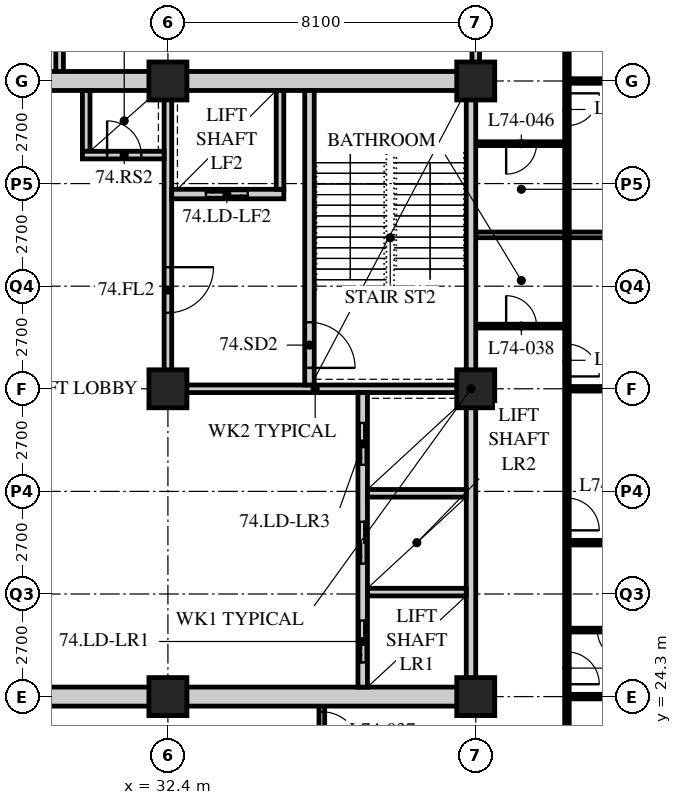
"""IFC4 building model, lengths in metres.
Left out: names, types, materials, properties, quantities, classifications, styles, units other than length and angle.
Written with IfcOpenShell. Run it as: python <this file> out.ifc"""

import sys

from ifc_helpers import new_model, si_unit, direction, frame, frame_2d, origin, origin_2d, place, context, subcontext, project, spatial, rectangle, hollow_rectangle, extrude, element, fill, save


model = new_model("IFC4")
c1 = context("Model", 3, precision=1e-05, world=origin(), true_north=direction((0.0, 1.0)))
c2 = subcontext(c1, "Body", "Model", "MODEL_VIEW")
j1 = project(units=[si_unit("LENGTHUNIT", "METRE"), si_unit("PLANEANGLEUNIT", "RADIAN")], contexts=[c1])
p1 = place(None, origin())
s1 = spatial("IfcSite", under=j1, at=p1, CompositionType="ELEMENT")
p2 = place(p1, origin())
s2 = spatial("IfcBuilding", under=s1, at=p2, CompositionType="ELEMENT")
p3 = place(p2, frame((0.0, 0.0, 289.2)))
s3 = spatial("IfcBuildingStorey", under=s2, at=p3, CompositionType="ELEMENT", Elevation=289.2)
for number, where, z_axis, x_axis in (
    (1, (32.4, 24.3, 0.0), (0.0, 0.0, 1.0), (1.0, 0.0, 0.0)),
    (2, (32.4, 32.4, 0.0), (0.0, 0.0, 1.0), (1.0, 0.0, 0.0)),
    (3, (32.4, 40.5, 0.0), (0.0, 0.0, 1.0), (1.0, 0.0, 0.0)),
    (4, (40.5, 24.3, 0.0), (0.0, 0.0, 1.0), (1.0, 0.0, 0.0)),
    (5, (40.5, 32.4, 0.0), (0.0, 0.0, 1.0), (1.0, 0.0, 0.0)),
    (6, (40.5, 40.5, 0.0), (0.0, 0.0, 1.0), (1.0, 0.0, 0.0)),
):
    element("IfcColumn", number, at=place(p3, frame(where, z_axis=z_axis, x_axis=x_axis)), inside=s3, PredefinedType="COLUMN", context=c2, shape_type="SweptSolid", body=[
        extrude(hollow_rectangle(XDim=1.0, YDim=1.0, WallThickness=0.1, at=origin_2d()), origin(), (0.0, 0.0, 1.0), 3.9),
    ])
p4 = place(p3, frame((29.55, 40.5, 0.0), z_axis=(0.0, 0.0, 1.0), x_axis=(0.0, 1.0, 0.0)))
e7 = element("IfcWall", 7, at=p4, inside=s3, PredefinedType="SOLIDWALL", context=c2, shape_type="SweptSolid", body=[
    extrude(rectangle(XDim=6.3, YDim=0.2, at=frame_2d((3.15, 0.0))), origin(), (0.0, 0.0, 1.0), 3.69),
])
p5 = place(p3, frame((36.45, 22.5, 0.0), z_axis=(0.0, 0.0, 1.0), x_axis=(0.0, 1.0, 0.0)))
e8 = element("IfcWall", 8, at=p5, inside=s3, PredefinedType="PARTITIONING", context=c2, shape_type="SweptSolid", body=[
    extrude(rectangle(XDim=1.8, YDim=0.15, at=frame_2d((0.9, 0.0))), origin(), (0.0, 0.0, 1.0), 3.69),
])
p6 = place(p5, frame((0.4, 0.0, 0.0)))
e9 = element("IfcOpeningElement", 9, at=p6, cuts=e8, PredefinedType="OPENING", context=c2, shape_type="SweptSolid", body=[
    extrude(rectangle(XDim=1.0, YDim=2.1, at=frame_2d((0.5, 1.05))), frame((0.0, 0.085, 0.0), z_axis=(0.0, -1.0, 0.0), x_axis=(1.0, 0.0, 0.0)), (0.0, 0.0, 1.0), 0.17),
])
p7 = place(p3, frame((40.5, 40.5, 0.0), z_axis=(0.0, 0.0, 1.0), x_axis=(0.0, 1.0, 0.0)))
e10 = element("IfcWall", 10, at=p7, inside=s3, PredefinedType="SOLIDWALL", context=c2, shape_type="SweptSolid", body=[
    extrude(rectangle(XDim=6.3, YDim=0.2, at=frame_2d((3.15, 0.0))), origin(), (0.0, 0.0, 1.0), 3.078),
])
p8 = place(p3, frame((40.5, 34.05, 0.0), z_axis=(0.0, 0.0, 1.0), x_axis=(1.0, 0.0, 0.0)))
e11 = element("IfcWall", 11, at=p8, inside=s3, PredefinedType="PARTITIONING", context=c2, shape_type="SweptSolid", body=[
    extrude(rectangle(XDim=2.4, YDim=0.1, at=frame_2d((1.2, 0.0))), origin(), (0.0, 0.0, 1.0), 3.69),
])
p9 = place(p8, frame((0.8, 0.0, 0.0)))
e12 = element("IfcOpeningElement", 12, at=p9, cuts=e11, PredefinedType="OPENING", context=c2, shape_type="SweptSolid", body=[
    extrude(rectangle(XDim=0.8, YDim=2.1, at=frame_2d((0.4, 1.05))), frame((0.0, 0.06, 0.0), z_axis=(0.0, -1.0, 0.0), x_axis=(1.0, 0.0, 0.0)), (0.0, 0.0, 1.0), 0.12),
])
p10 = place(p3, frame((42.9, 22.5, 0.0), z_axis=(0.0, 0.0, 1.0), x_axis=(0.0, 1.0, 0.0)))
e13 = element("IfcWall", 13, at=p10, inside=s3, PredefinedType="PARTITIONING", context=c2, shape_type="SweptSolid", body=[
    extrude(rectangle(XDim=13.95, YDim=0.12, at=frame_2d((6.975, 0.0))), origin(), (0.0, 0.0, 1.0), 3.69),
])
p11 = place(p10, frame((2.125, 0.0, 0.0)))
e14 = element("IfcOpeningElement", 14, at=p11, cuts=e13, PredefinedType="OPENING", context=c2, shape_type="SweptSolid", body=[
    extrude(rectangle(XDim=0.85, YDim=2.1, at=frame_2d((0.425, 1.05))), frame((0.0, 0.07, 0.0), z_axis=(0.0, -1.0, 0.0), x_axis=(1.0, 0.0, 0.0)), (0.0, 0.0, 1.0), 0.14),
])
p12 = place(p10, frame((6.175, 0.0, 0.0)))
e15 = element("IfcOpeningElement", 15, at=p12, cuts=e13, PredefinedType="OPENING", context=c2, shape_type="SweptSolid", body=[
    extrude(rectangle(XDim=0.85, YDim=2.1, at=frame_2d((0.425, 1.05))), frame((0.0, 0.07, 0.0), z_axis=(0.0, -1.0, 0.0), x_axis=(1.0, 0.0, 0.0)), (0.0, 0.0, 1.0), 0.14),
])
p13 = place(p10, frame((10.225, 0.0, 0.0)))
e16 = element("IfcOpeningElement", 16, at=p13, cuts=e13, PredefinedType="OPENING", context=c2, shape_type="SweptSolid", body=[
    extrude(rectangle(XDim=0.85, YDim=2.1, at=frame_2d((0.425, 1.05))), frame((0.0, 0.07, 0.0), z_axis=(0.0, -1.0, 0.0), x_axis=(1.0, 0.0, 0.0)), (0.0, 0.0, 1.0), 0.14),
])
p14 = place(p3, frame((42.9, 24.3, 0.0), z_axis=(0.0, 0.0, 1.0), x_axis=(1.0, 0.0, 0.0)))
e17 = element("IfcWall", 17, at=p14, inside=s3, PredefinedType="PARTITIONING", context=c2, shape_type="SweptSolid", body=[
    extrude(rectangle(XDim=9.45, YDim=0.12, at=frame_2d((4.725, 0.0))), origin(), (0.0, 0.0, 1.0), 3.078),
])
p15 = place(p3, frame((40.5, 36.45, 0.0), z_axis=(0.0, 0.0, 1.0), x_axis=(1.0, 0.0, 0.0)))
e18 = element("IfcWall", 18, at=p15, inside=s3, PredefinedType="PARTITIONING", context=c2, shape_type="SweptSolid", body=[
    extrude(rectangle(XDim=15.9, YDim=0.15, at=frame_2d((7.95, 0.0))), origin(), (0.0, 0.0, 1.0), 3.69),
])
p16 = place(p3, frame((42.9, 26.05, 0.0), z_axis=(0.0, 0.0, 1.0), x_axis=(1.0, 0.0, 0.0)))
e19 = element("IfcWall", 19, at=p16, inside=s3, PredefinedType="PARTITIONING", context=c2, shape_type="SweptSolid", body=[
    extrude(rectangle(XDim=2.4, YDim=0.1, at=frame_2d((1.2, 0.0))), origin(), (0.0, 0.0, 1.0), 3.69),
])
p17 = place(p16, frame((0.8, 0.0, 0.0)))
e20 = element("IfcOpeningElement", 20, at=p17, cuts=e19, PredefinedType="OPENING", context=c2, shape_type="SweptSolid", body=[
    extrude(rectangle(XDim=0.8, YDim=2.1, at=frame_2d((0.4, 1.05))), frame((0.0, 0.06, 0.0), z_axis=(0.0, -1.0, 0.0), x_axis=(1.0, 0.0, 0.0)), (0.0, 0.0, 1.0), 0.12),
])
p18 = place(p3, frame((42.9, 28.35, 0.0), z_axis=(0.0, 0.0, 1.0), x_axis=(1.0, 0.0, 0.0)))
e21 = element("IfcWall", 21, at=p18, inside=s3, PredefinedType="PARTITIONING", context=c2, shape_type="SweptSolid", body=[
    extrude(rectangle(XDim=13.5, YDim=0.12, at=frame_2d((6.75, 0.0))), origin(), (0.0, 0.0, 1.0), 3.69),
])
p19 = place(p3, frame((42.9, 32.4, 0.0), z_axis=(0.0, 0.0, 1.0), x_axis=(1.0, 0.0, 0.0)))
e22 = element("IfcWall", 22, at=p19, inside=s3, PredefinedType="PARTITIONING", context=c2, shape_type="SweptSolid", body=[
    extrude(rectangle(XDim=13.5, YDim=0.12, at=frame_2d((6.75, 0.0))), origin(), (0.0, 0.0, 1.0), 3.078),
])
p20 = place(p3, frame((40.5, 38.85, 0.0), z_axis=(0.0, 0.0, 1.0), x_axis=(1.0, 0.0, 0.0)))
e23 = element("IfcWall", 23, at=p20, inside=s3, PredefinedType="PARTITIONING", context=c2, shape_type="SweptSolid", body=[
    extrude(rectangle(XDim=2.4, YDim=0.1, at=frame_2d((1.2, 0.0))), origin(), (0.0, 0.0, 1.0), 3.69),
])
p21 = place(p20, frame((0.8, 0.0, 0.0)))
e24 = element("IfcOpeningElement", 24, at=p21, cuts=e23, PredefinedType="OPENING", context=c2, shape_type="SweptSolid", body=[
    extrude(rectangle(XDim=0.8, YDim=2.1, at=frame_2d((0.4, 1.05))), frame((0.0, 0.06, 0.0), z_axis=(0.0, -1.0, 0.0), x_axis=(1.0, 0.0, 0.0)), (0.0, 0.0, 1.0), 0.12),
])
p22 = place(p3, frame((42.9, 48.6, 0.0), z_axis=(0.0, 0.0, 1.0), x_axis=(0.0, -1.0, 0.0)))
e25 = element("IfcWall", 25, at=p22, inside=s3, PredefinedType="PARTITIONING", context=c2, shape_type="SweptSolid", body=[
    extrude(rectangle(XDim=12.15, YDim=0.12, at=frame_2d((6.075, 0.0))), origin(), (0.0, 0.0, 1.0), 3.69),
])
p23 = place(p22, frame((2.125, 0.0, 0.0)))
e26 = element("IfcOpeningElement", 26, at=p23, cuts=e25, PredefinedType="OPENING", context=c2, shape_type="SweptSolid", body=[
    extrude(rectangle(XDim=0.85, YDim=2.1, at=frame_2d((0.425, 1.05))), frame((0.0, 0.07, 0.0), z_axis=(0.0, -1.0, 0.0), x_axis=(1.0, 0.0, 0.0)), (0.0, 0.0, 1.0), 0.14),
])
p24 = place(p22, frame((8.425, 0.0, 0.0)))
e27 = element("IfcOpeningElement", 27, at=p24, cuts=e25, PredefinedType="OPENING", context=c2, shape_type="SweptSolid", body=[
    extrude(rectangle(XDim=0.85, YDim=2.1, at=frame_2d((0.425, 1.05))), frame((0.0, 0.07, 0.0), z_axis=(0.0, -1.0, 0.0), x_axis=(1.0, 0.0, 0.0)), (0.0, 0.0, 1.0), 0.14),
])
p25 = place(p3, frame((42.9, 40.5, 0.0), z_axis=(0.0, 0.0, 1.0), x_axis=(1.0, 0.0, 0.0)))
e28 = element("IfcWall", 28, at=p25, inside=s3, PredefinedType="PARTITIONING", context=c2, shape_type="SweptSolid", body=[
    extrude(rectangle(XDim=13.5, YDim=0.12, at=frame_2d((6.75, 0.0))), origin(), (0.0, 0.0, 1.0), 3.078),
])
p26 = place(p3, frame((15.95, 24.3, 0.0), z_axis=(0.0, 0.0, 1.0), x_axis=(1.0, 0.0, 0.0)))
e29 = element("IfcWall", 29, at=p26, inside=s3, PredefinedType="SOLIDWALL", context=c2, shape_type="SweptSolid", body=[
    extrude(rectangle(XDim=24.55, YDim=0.5, at=frame_2d((12.275, 0.0))), origin(), (0.0, 0.0, 1.0), 3.04),
])
p27 = place(p26, frame((11.5, 0.0, 0.0)))
e30 = element("IfcOpeningElement", 30, at=p27, cuts=e29, PredefinedType="OPENING", context=c2, shape_type="SweptSolid", body=[
    extrude(rectangle(XDim=1.8, YDim=2.4, at=frame_2d((0.9, 1.2))), frame((0.0, 0.26, 0.0), z_axis=(0.0, -1.0, 0.0), x_axis=(1.0, 0.0, 0.0)), (0.0, 0.0, 1.0), 0.52),
])
p28 = place(p3, frame((15.95, 40.5, 0.0), z_axis=(0.0, 0.0, 1.0), x_axis=(1.0, 0.0, 0.0)))
e31 = element("IfcWall", 31, at=p28, inside=s3, PredefinedType="SOLIDWALL", context=c2, shape_type="SweptSolid", body=[
    extrude(rectangle(XDim=24.55, YDim=0.5, at=frame_2d((12.275, 0.0))), origin(), (0.0, 0.0, 1.0), 3.04),
])
p29 = place(p28, frame((11.5, 0.0, 0.0)))
e32 = element("IfcOpeningElement", 32, at=p29, cuts=e31, PredefinedType="OPENING", context=c2, shape_type="SweptSolid", body=[
    extrude(rectangle(XDim=1.8, YDim=2.4, at=frame_2d((0.9, 1.2))), frame((0.0, 0.26, 0.0), z_axis=(0.0, -1.0, 0.0), x_axis=(1.0, 0.0, 0.0)), (0.0, 0.0, 1.0), 0.52),
])
p30 = place(p3, frame((40.375, 24.55, 0.0), z_axis=(0.0, 0.0, 1.0), x_axis=(0.0, 1.0, 0.0)))
e33 = element("IfcWall", 33, at=p30, inside=s3, PredefinedType="SOLIDWALL", context=c2, shape_type="SweptSolid", body=[
    extrude(rectangle(XDim=15.7, YDim=0.25, at=frame_2d((7.85, 0.0))), origin(), (0.0, 0.0, 1.0), 3.078),
])
p31 = place(p3, frame((32.3, 32.4, 0.0), z_axis=(0.0, 0.0, 1.0), x_axis=(1.0, 0.0, 0.0)))
e34 = element("IfcWall", 34, at=p31, inside=s3, PredefinedType="SOLIDWALL", context=c2, shape_type="SweptSolid", body=[
    extrude(rectangle(XDim=7.95, YDim=0.2, at=frame_2d((3.975, 0.0))), origin(), (0.0, 0.0, 1.0), 3.078),
])
p32 = place(p3, frame((32.4, 32.5, 0.0), z_axis=(0.0, 0.0, 1.0), x_axis=(0.0, 1.0, 0.0)))
e35 = element("IfcWall", 35, at=p32, inside=s3, PredefinedType="SOLIDWALL", context=c2, shape_type="SweptSolid", body=[
    extrude(rectangle(XDim=7.75, YDim=0.2, at=frame_2d((3.875, 0.0))), origin(), (0.0, 0.0, 1.0), 3.078),
])
p33 = place(p32, frame((1.9, 0.0, 0.0)))
e36 = element("IfcOpeningElement", 36, at=p33, cuts=e35, PredefinedType="OPENING", context=c2, shape_type="SweptSolid", body=[
    extrude(rectangle(XDim=1.2, YDim=2.1, at=frame_2d((0.6, 1.05))), frame((0.0, 0.11, 0.0), z_axis=(0.0, -1.0, 0.0), x_axis=(1.0, 0.0, 0.0)), (0.0, 0.0, 1.0), 0.22),
])
p34 = place(p3, frame((37.525, 24.55, 0.0), z_axis=(0.0, 0.0, 1.0), x_axis=(0.0, 1.0, 0.0)))
e37 = element("IfcWall", 37, at=p34, inside=s3, PredefinedType="SOLIDWALL", context=c2, shape_type="SweptSolid", body=[
    extrude(rectangle(XDim=7.75, YDim=0.25, at=frame_2d((3.875, 0.0))), origin(), (0.0, 0.0, 1.0), 3.69),
])
p35 = place(p34, frame((0.65, 0.0, 0.0)))
e38 = element("IfcOpeningElement", 38, at=p35, cuts=e37, PredefinedType="OPENING", context=c2, shape_type="SweptSolid", body=[
    extrude(rectangle(XDim=1.1, YDim=2.4, at=frame_2d((0.55, 1.2))), frame((0.0, 0.135, 0.0), z_axis=(0.0, -1.0, 0.0), x_axis=(1.0, 0.0, 0.0)), (0.0, 0.0, 1.0), 0.27),
])
p36 = place(p34, frame((3.25, 0.0, 0.0)))
e39 = element("IfcOpeningElement", 39, at=p36, cuts=e37, PredefinedType="OPENING", context=c2, shape_type="SweptSolid", body=[
    extrude(rectangle(XDim=1.1, YDim=2.4, at=frame_2d((0.55, 1.2))), frame((0.0, 0.135, 0.0), z_axis=(0.0, -1.0, 0.0), x_axis=(1.0, 0.0, 0.0)), (0.0, 0.0, 1.0), 0.27),
])
p37 = place(p34, frame((5.85, 0.0, 0.0)))
e40 = element("IfcOpeningElement", 40, at=p37, cuts=e37, PredefinedType="OPENING", context=c2, shape_type="SweptSolid", body=[
    extrude(rectangle(XDim=1.1, YDim=2.4, at=frame_2d((0.55, 1.2))), frame((0.0, 0.135, 0.0), z_axis=(0.0, -1.0, 0.0), x_axis=(1.0, 0.0, 0.0)), (0.0, 0.0, 1.0), 0.27),
])
for number, where, z_axis, x_axis in (
    (41, (37.65, 27.05, 0.0), (0.0, 0.0, 1.0), (1.0, 0.0, 0.0)),
    (42, (37.65, 29.65, 0.0), (0.0, 0.0, 1.0), (1.0, 0.0, 0.0)),
):
    element("IfcWall", number, at=place(p3, frame(where, z_axis=z_axis, x_axis=x_axis)), inside=s3, PredefinedType="SOLIDWALL", context=c2, shape_type="SweptSolid", body=[
        extrude(rectangle(XDim=2.6, YDim=0.2, at=frame_2d((1.3, 0.0))), origin(), (0.0, 0.0, 1.0), 3.69),
    ])
p38 = place(p3, frame((36.125, 32.5, 0.0), z_axis=(0.0, 0.0, 1.0), x_axis=(0.0, 1.0, 0.0)))
e43 = element("IfcWall", 43, at=p38, inside=s3, PredefinedType="SOLIDWALL", context=c2, shape_type="SweptSolid", body=[
    extrude(rectangle(XDim=7.75, YDim=0.25, at=frame_2d((3.875, 0.0))), origin(), (0.0, 0.0, 1.0), 3.69),
])
p39 = place(p38, frame((0.45, 0.0, 0.0)))
e44 = element("IfcOpeningElement", 44, at=p39, cuts=e43, PredefinedType="OPENING", context=c2, shape_type="SweptSolid", body=[
    extrude(rectangle(XDim=1.2, YDim=2.1, at=frame_2d((0.6, 1.05))), frame((0.0, 0.135, 0.0), z_axis=(0.0, -1.0, 0.0), x_axis=(1.0, 0.0, 0.0)), (0.0, 0.0, 1.0), 0.27),
])
p40 = place(p3, frame((32.5, 37.525, 0.0), z_axis=(0.0, 0.0, 1.0), x_axis=(1.0, 0.0, 0.0)))
e45 = element("IfcWall", 45, at=p40, inside=s3, PredefinedType="SOLIDWALL", context=c2, shape_type="SweptSolid", body=[
    extrude(rectangle(XDim=2.95, YDim=0.25, at=frame_2d((1.475, 0.0))), origin(), (0.0, 0.0, 1.0), 3.69),
])
p41 = place(p40, frame((0.9, 0.0, 0.0)))
e46 = element("IfcOpeningElement", 46, at=p41, cuts=e45, PredefinedType="OPENING", context=c2, shape_type="SweptSolid", body=[
    extrude(rectangle(XDim=1.1, YDim=2.4, at=frame_2d((0.55, 1.2))), frame((0.0, 0.135, 0.0), z_axis=(0.0, -1.0, 0.0), x_axis=(1.0, 0.0, 0.0)), (0.0, 0.0, 1.0), 0.27),
])
p42 = place(p3, frame((35.35, 37.65, 0.0), z_axis=(0.0, 0.0, 1.0), x_axis=(0.0, 1.0, 0.0)))
e47 = element("IfcWall", 47, at=p42, inside=s3, PredefinedType="SOLIDWALL", context=c2, shape_type="SweptSolid", body=[
    extrude(rectangle(XDim=2.6, YDim=0.2, at=frame_2d((1.3, 0.0))), origin(), (0.0, 0.0, 1.0), 3.69),
])
p43 = place(p3, frame((30.25, 38.65, 0.0), z_axis=(0.0, 0.0, 1.0), x_axis=(0.0, 1.0, 0.0)))
e48 = element("IfcWall", 48, at=p43, inside=s3, PredefinedType="SOLIDWALL", context=c2, shape_type="SweptSolid", body=[
    extrude(rectangle(XDim=1.6, YDim=0.2, at=frame_2d((0.8, 0.0))), origin(), (0.0, 0.0, 1.0), 3.69),
])
p44 = place(p3, frame((30.15, 38.55, 0.0), z_axis=(0.0, 0.0, 1.0), x_axis=(1.0, 0.0, 0.0)))
e49 = element("IfcWall", 49, at=p44, inside=s3, PredefinedType="SOLIDWALL", context=c2, shape_type="SweptSolid", body=[
    extrude(rectangle(XDim=2.15, YDim=0.2, at=frame_2d((1.075, 0.0))), origin(), (0.0, 0.0, 1.0), 3.69),
])
p45 = place(p44, frame((0.65, 0.0, 0.0)))
e50 = element("IfcOpeningElement", 50, at=p45, cuts=e49, PredefinedType="OPENING", context=c2, shape_type="SweptSolid", body=[
    extrude(rectangle(XDim=0.9, YDim=2.1, at=frame_2d((0.45, 1.05))), frame((0.0, 0.11, 0.0), z_axis=(0.0, -1.0, 0.0), x_axis=(1.0, 0.0, 0.0)), (0.0, 0.0, 1.0), 0.22),
])
p46 = place(p6, origin())
e51 = element("IfcDoor", 51, at=p46, inside=s3, OperationType="SINGLE_SWING_RIGHT", PredefinedType="DOOR", context=c2, shape_type="SweptSolid", body=[
    extrude(rectangle(XDim=1.0, YDim=2.1, at=frame_2d((0.5, 1.05))), frame((0.0, 0.025, 0.0), z_axis=(0.0, -1.0, 0.0), x_axis=(1.0, 0.0, 0.0)), (0.0, 0.0, 1.0), 0.05),
])
fill(e9, e51)
p47 = place(p9, origin())
e52 = element("IfcDoor", 52, at=p47, inside=s3, OperationType="SINGLE_SWING_LEFT", PredefinedType="DOOR", context=c2, shape_type="SweptSolid", body=[
    extrude(rectangle(XDim=0.8, YDim=2.1, at=frame_2d((0.4, 1.05))), frame((0.0, 0.025, 0.0), z_axis=(0.0, -1.0, 0.0), x_axis=(1.0, 0.0, 0.0)), (0.0, 0.0, 1.0), 0.05),
])
fill(e12, e52)
p48 = place(p17, origin())
e53 = element("IfcDoor", 53, at=p48, inside=s3, OperationType="SINGLE_SWING_LEFT", PredefinedType="DOOR", context=c2, shape_type="SweptSolid", body=[
    extrude(rectangle(XDim=0.8, YDim=2.1, at=frame_2d((0.4, 1.05))), frame((0.0, 0.025, 0.0), z_axis=(0.0, -1.0, 0.0), x_axis=(1.0, 0.0, 0.0)), (0.0, 0.0, 1.0), 0.05),
])
fill(e20, e53)
p49 = place(p11, origin())
e54 = element("IfcDoor", 54, at=p49, inside=s3, OperationType="SINGLE_SWING_RIGHT", PredefinedType="DOOR", context=c2, shape_type="SweptSolid", body=[
    extrude(rectangle(XDim=0.85, YDim=2.1, at=frame_2d((0.425, 1.05))), frame((0.0, 0.025, 0.0), z_axis=(0.0, -1.0, 0.0), x_axis=(1.0, 0.0, 0.0)), (0.0, 0.0, 1.0), 0.05),
])
fill(e14, e54)
p50 = place(p12, origin())
e55 = element("IfcDoor", 55, at=p50, inside=s3, OperationType="SINGLE_SWING_RIGHT", PredefinedType="DOOR", context=c2, shape_type="SweptSolid", body=[
    extrude(rectangle(XDim=0.85, YDim=2.1, at=frame_2d((0.425, 1.05))), frame((0.0, 0.025, 0.0), z_axis=(0.0, -1.0, 0.0), x_axis=(1.0, 0.0, 0.0)), (0.0, 0.0, 1.0), 0.05),
])
fill(e15, e55)
p51 = place(p13, origin())
e56 = element("IfcDoor", 56, at=p51, inside=s3, OperationType="SINGLE_SWING_RIGHT", PredefinedType="DOOR", context=c2, shape_type="SweptSolid", body=[
    extrude(rectangle(XDim=0.85, YDim=2.1, at=frame_2d((0.425, 1.05))), frame((0.0, 0.025, 0.0), z_axis=(0.0, -1.0, 0.0), x_axis=(1.0, 0.0, 0.0)), (0.0, 0.0, 1.0), 0.05),
])
fill(e16, e56)
p52 = place(p21, origin())
e57 = element("IfcDoor", 57, at=p52, inside=s3, OperationType="SINGLE_SWING_RIGHT", PredefinedType="DOOR", context=c2, shape_type="SweptSolid", body=[
    extrude(rectangle(XDim=0.8, YDim=2.1, at=frame_2d((0.4, 1.05))), frame((0.0, 0.025, 0.0), z_axis=(0.0, -1.0, 0.0), x_axis=(1.0, 0.0, 0.0)), (0.0, 0.0, 1.0), 0.05),
])
fill(e24, e57)
p53 = place(p24, origin())
e58 = element("IfcDoor", 58, at=p53, inside=s3, OperationType="SINGLE_SWING_LEFT", PredefinedType="DOOR", context=c2, shape_type="SweptSolid", body=[
    extrude(rectangle(XDim=0.85, YDim=2.1, at=frame_2d((0.425, 1.05))), frame((0.0, 0.025, 0.0), z_axis=(0.0, -1.0, 0.0), x_axis=(1.0, 0.0, 0.0)), (0.0, 0.0, 1.0), 0.05),
])
fill(e27, e58)
p54 = place(p39, origin())
e59 = element("IfcDoor", 59, at=p54, inside=s3, OperationType="SINGLE_SWING_RIGHT", PredefinedType="DOOR", context=c2, shape_type="SweptSolid", body=[
    extrude(rectangle(XDim=1.2, YDim=2.1, at=frame_2d((0.6, 1.05))), frame((0.0, 0.025, 0.0), z_axis=(0.0, -1.0, 0.0), x_axis=(1.0, 0.0, 0.0)), (0.0, 0.0, 1.0), 0.05),
])
fill(e44, e59)
p55 = place(p33, origin())
e60 = element("IfcDoor", 60, at=p55, inside=s3, OperationType="SINGLE_SWING_LEFT", PredefinedType="DOOR", context=c2, shape_type="SweptSolid", body=[
    extrude(rectangle(XDim=1.2, YDim=2.1, at=frame_2d((0.6, 1.05))), frame((0.0, 0.025, 0.0), z_axis=(0.0, -1.0, 0.0), x_axis=(1.0, 0.0, 0.0)), (0.0, 0.0, 1.0), 0.05),
])
fill(e36, e60)
p56 = place(p45, origin())
e61 = element("IfcDoor", 61, at=p56, inside=s3, OperationType="SINGLE_SWING_LEFT", PredefinedType="DOOR", context=c2, shape_type="SweptSolid", body=[
    extrude(rectangle(XDim=0.9, YDim=2.1, at=frame_2d((0.45, 1.05))), frame((0.0, 0.025, 0.0), z_axis=(0.0, -1.0, 0.0), x_axis=(1.0, 0.0, 0.0)), (0.0, 0.0, 1.0), 0.05),
])
fill(e50, e61)
p57 = place(p35, origin())
e62 = element("IfcDoor", 62, at=p57, inside=s3, OperationType="DOUBLE_DOOR_SLIDING", PredefinedType="DOOR", context=c2, shape_type="SweptSolid", body=[
    extrude(rectangle(XDim=1.1, YDim=2.4, at=frame_2d((0.55, 1.2))), frame((0.0, 0.025, 0.0), z_axis=(0.0, -1.0, 0.0), x_axis=(1.0, 0.0, 0.0)), (0.0, 0.0, 1.0), 0.05),
])
fill(e38, e62)
p58 = place(p36, origin())
e63 = element("IfcDoor", 63, at=p58, inside=s3, OperationType="DOUBLE_DOOR_SLIDING", PredefinedType="DOOR", context=c2, shape_type="SweptSolid", body=[
    extrude(rectangle(XDim=1.1, YDim=2.4, at=frame_2d((0.55, 1.2))), frame((0.0, 0.025, 0.0), z_axis=(0.0, -1.0, 0.0), x_axis=(1.0, 0.0, 0.0)), (0.0, 0.0, 1.0), 0.05),
])
fill(e39, e63)
p59 = place(p37, origin())
e64 = element("IfcDoor", 64, at=p59, inside=s3, OperationType="DOUBLE_DOOR_SLIDING", PredefinedType="DOOR", context=c2, shape_type="SweptSolid", body=[
    extrude(rectangle(XDim=1.1, YDim=2.4, at=frame_2d((0.55, 1.2))), frame((0.0, 0.025, 0.0), z_axis=(0.0, -1.0, 0.0), x_axis=(1.0, 0.0, 0.0)), (0.0, 0.0, 1.0), 0.05),
])
fill(e40, e64)
p60 = place(p41, origin())
e65 = element("IfcDoor", 65, at=p60, inside=s3, OperationType="DOUBLE_DOOR_SLIDING", PredefinedType="DOOR", context=c2, shape_type="SweptSolid", body=[
    extrude(rectangle(XDim=1.1, YDim=2.4, at=frame_2d((0.55, 1.2))), frame((0.0, 0.025, 0.0), z_axis=(0.0, -1.0, 0.0), x_axis=(1.0, 0.0, 0.0)), (0.0, 0.0, 1.0), 0.05),
])
fill(e46, e65)
save(model, sys.argv[1])
